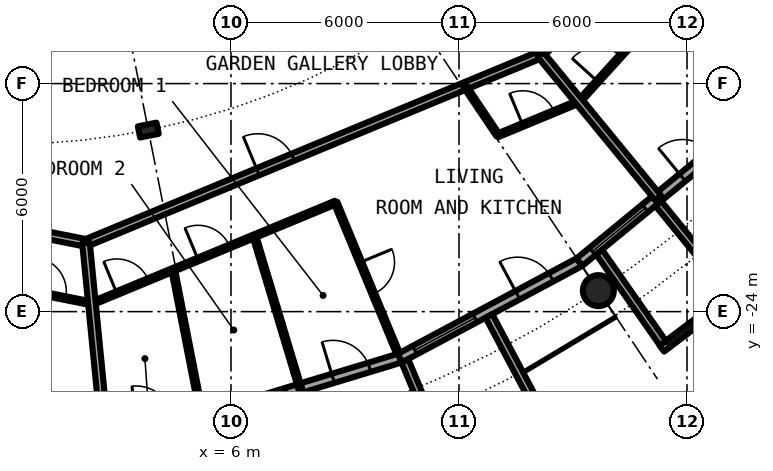
"""IFC4 building model, lengths in metres.
Left out: names, types, materials, properties, quantities, classifications, styles, units other than length and angle.
Written with IfcOpenShell. Run it as: python <this file> out.ifc"""

import sys

from ifc_helpers import new_model, si_unit, direction, frame, frame_2d, origin, origin_2d, place, context, subcontext, project, spatial, rectangle, circle, hollow_circle, i_section, extrude, element, fill, save


model = new_model("IFC4")
c1 = context("Model", 3, precision=1e-05, world=origin(), true_north=direction((0.0, 1.0)))
c2 = subcontext(c1, "Body", "Model", "MODEL_VIEW")
j1 = project(units=[si_unit("LENGTHUNIT", "METRE"), si_unit("PLANEANGLEUNIT", "RADIAN")], contexts=[c1])
p1 = place(None, origin())
s1 = spatial("IfcSite", under=j1, at=p1, CompositionType="ELEMENT")
p2 = place(p1, origin())
s2 = spatial("IfcBuilding", under=s1, at=p2, CompositionType="ELEMENT")
p3 = place(p2, frame((0.0, 0.0, 145.2)))
s3 = spatial("IfcBuildingStorey", under=s2, at=p3, CompositionType="ELEMENT", Elevation=145.2)
p4 = place(p3, frame((15.667, -23.448, 0.0), z_axis=(0.0, 0.0, 1.0), x_axis=(1.0, 0.0, 0.0)))
e1 = element("IfcColumn", 1, at=p4, inside=s3, PredefinedType="COLUMN", context=c2, shape_type="SweptSolid", body=[
    extrude(hollow_circle(Radius=0.406, WallThickness=0.04, at=origin_2d()), origin(), (0.0, 0.0, 1.0), 3.05),
])
p5 = place(p3, frame((3.824, -19.223, 0.0), z_axis=(0.0, 0.0, 1.0), x_axis=(0.195090322016, -0.980785280403, 0.0)))
e2 = element("IfcColumn", 2, at=p5, inside=s3, PredefinedType="COLUMN", context=c2, shape_type="SweptSolid", body=[
    extrude(i_section(OverallWidth=0.3, OverallDepth=0.5, WebThickness=0.014, FlangeThickness=0.028, FilletRadius=0.027, at=origin_2d()), origin(), (0.0, 0.0, 1.0), 3.05),
])
p6 = place(p3, frame((5.326, -26.775, 0.0), z_axis=(0.0, 0.0, 1.0), x_axis=(0.956965678721, 0.290201119486, 0.0)))
e3 = element("IfcWall", 3, at=p6, inside=s3, PredefinedType="SOLIDWALL", context=c2, shape_type="SweptSolid", body=[
    extrude(rectangle(XDim=5.351, YDim=0.25, at=frame_2d((2.676, 0.0))), origin(), (0.0, 0.0, 1.0), 2.7),
])
p7 = place(p6, frame((0.441, 0.0, 0.3)))
e4 = element("IfcOpeningElement", 4, at=p7, cuts=e3, PredefinedType="OPENING", context=c2, shape_type="SweptSolid", body=[
    extrude(rectangle(XDim=1.8, YDim=2.1, at=frame_2d((0.9, 1.05))), frame((0.0, 0.135, 0.0), z_axis=(0.0, -1.0, 0.0), x_axis=(1.0, 0.0, 0.0)), (0.0, 0.0, 1.0), 0.27),
])
p8 = place(p6, frame((3.51, 0.0, 0.0)))
e5 = element("IfcOpeningElement", 5, at=p8, cuts=e3, PredefinedType="OPENING", context=c2, shape_type="SweptSolid", body=[
    extrude(rectangle(XDim=1.0, YDim=2.2, at=frame_2d((0.5, 1.1))), frame((0.0, 0.135, 0.0), z_axis=(0.0, -1.0, 0.0), x_axis=(1.0, 0.0, 0.0)), (0.0, 0.0, 1.0), 0.27),
])
p9 = place(p3, frame((10.447, -25.222, 0.0), z_axis=(0.0, 0.0, 1.0), x_axis=(0.881915646801, 0.471407246368, 0.0)))
e6 = element("IfcWall", 6, at=p9, inside=s3, PredefinedType="SOLIDWALL", context=c2, shape_type="SweptSolid", body=[
    extrude(rectangle(XDim=5.352, YDim=0.25, at=frame_2d((2.676, 0.0))), origin(), (0.0, 0.0, 1.0), 2.7),
])
p10 = place(p9, frame((0.441, 0.0, 0.3)))
e7 = element("IfcOpeningElement", 7, at=p10, cuts=e6, PredefinedType="OPENING", context=c2, shape_type="SweptSolid", body=[
    extrude(rectangle(XDim=1.8, YDim=2.1, at=frame_2d((0.9, 1.05))), frame((0.0, 0.135, 0.0), z_axis=(0.0, -1.0, 0.0), x_axis=(1.0, 0.0, 0.0)), (0.0, 0.0, 1.0), 0.27),
])
p11 = place(p9, frame((3.51, 0.0, 0.0)))
e8 = element("IfcOpeningElement", 8, at=p11, cuts=e6, PredefinedType="OPENING", context=c2, shape_type="SweptSolid", body=[
    extrude(rectangle(XDim=1.0, YDim=2.2, at=frame_2d((0.5, 1.1))), frame((0.0, 0.135, 0.0), z_axis=(0.0, -1.0, 0.0), x_axis=(1.0, 0.0, 0.0)), (0.0, 0.0, 1.0), 0.27),
])
p12 = place(p3, frame((10.575, -25.295, -0.03), z_axis=(0.0, 0.0, 1.0), x_axis=(0.385697364644, -0.922625353492, 0.0)))
e9 = element("IfcWall", 9, at=p12, inside=s3, PredefinedType="SOLIDWALL", context=c2, shape_type="SweptSolid", body=[
    extrude(rectangle(XDim=2.883, YDim=0.2, at=frame_2d((1.442, 0.0))), origin(), (0.0, 0.0, 1.0), 2.73),
])
p13 = place(p3, frame((12.787, -24.113, -0.03), z_axis=(0.0, 0.0, 1.0), x_axis=(0.468365282436, -0.883534924159, 0.0)))
e10 = element("IfcWall", 10, at=p13, inside=s3, PredefinedType="SOLIDWALL", context=c2, shape_type="SweptSolid", body=[
    extrude(rectangle(XDim=3.006, YDim=0.2, at=frame_2d((1.503, 0.0))), origin(), (0.0, 0.0, 1.0), 2.73),
])
p14 = place(p3, frame((15.167, -22.699, 0.0), z_axis=(0.0, 0.0, 1.0), x_axis=(0.773019449054, 0.634382322723, 0.0)))
e11 = element("IfcWall", 11, at=p14, inside=s3, PredefinedType="SOLIDWALL", context=c2, shape_type="SweptSolid", body=[
    extrude(rectangle(XDim=5.352, YDim=0.25, at=frame_2d((2.676, 0.0))), origin(), (0.0, 0.0, 1.0), 2.7),
])
p15 = place(p14, frame((0.441, 0.0, 0.3)))
e12 = element("IfcOpeningElement", 12, at=p15, cuts=e11, PredefinedType="OPENING", context=c2, shape_type="SweptSolid", body=[
    extrude(rectangle(XDim=1.8, YDim=2.1, at=frame_2d((0.9, 1.05))), frame((0.0, 0.135, 0.0), z_axis=(0.0, -1.0, 0.0), x_axis=(1.0, 0.0, 0.0)), (0.0, 0.0, 1.0), 0.27),
])
p16 = place(p14, frame((3.51, 0.0, 0.0)))
e13 = element("IfcOpeningElement", 13, at=p16, cuts=e11, PredefinedType="OPENING", context=c2, shape_type="SweptSolid", body=[
    extrude(rectangle(XDim=1.0, YDim=2.2, at=frame_2d((0.5, 1.1))), frame((0.0, 0.135, 0.0), z_axis=(0.0, -1.0, 0.0), x_axis=(1.0, 0.0, 0.0)), (0.0, 0.0, 1.0), 0.27),
])
p17 = place(p3, frame((17.337, -24.972, -0.03), z_axis=(0.0, 0.0, 1.0), x_axis=(0.797887588059, 0.602806268067, 0.0)))
e14 = element("IfcWall", 14, at=p17, inside=s3, PredefinedType="SOLIDWALL", context=c2, shape_type="SweptSolid", body=[
    extrude(rectangle(XDim=2.447, YDim=0.2, at=frame_2d((1.223, 0.0))), origin(), (0.0, 0.0, 1.0), 2.73),
])
p18 = place(p17, frame((0.183, 0.0, 0.33)))
e15 = element("IfcOpeningElement", 15, at=p18, cuts=e14, PredefinedType="OPENING", context=c2, shape_type="SweptSolid", body=[
    extrude(circle(Radius=1.04, at=frame_2d((1.04, 1.04))), frame((0.0, 0.11, 0.0), z_axis=(0.0, -1.0, 0.0), x_axis=(1.0, 0.0, 0.0)), (0.0, 0.0, 1.0), 0.22),
])
p19 = place(p3, frame((15.688, -22.433, -0.03), z_axis=(0.0, 0.0, 1.0), x_axis=(0.573260687834, -0.819373043115, 0.0)))
e16 = element("IfcWall", 16, at=p19, inside=s3, PredefinedType="SOLIDWALL", context=c2, shape_type="SweptSolid", body=[
    extrude(rectangle(XDim=2.925, YDim=0.2, at=frame_2d((1.463, 0.0))), origin(), (0.0, 0.0, 1.0), 2.73),
])
p20 = place(p3, frame((17.246, -21.155, -0.03), z_axis=(0.0, 0.0, 1.0), x_axis=(0.631741648902, -0.775179004516, 0.0)))
e17 = element("IfcWall", 17, at=p20, inside=s3, PredefinedType="SOLIDWALL", context=c2, shape_type="SweptSolid", body=[
    extrude(rectangle(XDim=3.006, YDim=0.2, at=frame_2d((1.503, 0.0))), origin(), (0.0, 0.0, 1.0), 2.73),
])
p21 = place(p3, frame((15.162, -18.475, 0.0), z_axis=(0.0, 0.0, 1.0), x_axis=(0.671528384412, 0.740978831634, 0.0)))
e18 = element("IfcWall", 18, at=p21, inside=s3, PredefinedType="PARTITIONING", context=c2, shape_type="SweptSolid", body=[
    extrude(rectangle(XDim=2.338, YDim=0.1, at=frame_2d((1.169, 0.0))), origin(), (0.0, 0.0, 1.0), 2.7),
])
p22 = place(p21, frame((0.719, 0.0, 0.0)))
e19 = element("IfcOpeningElement", 19, at=p22, cuts=e18, PredefinedType="OPENING", context=c2, shape_type="SweptSolid", body=[
    extrude(rectangle(XDim=0.9, YDim=2.3, at=frame_2d((0.45, 1.15))), frame((0.0, 0.06, 0.0), z_axis=(0.0, -1.0, 0.0), x_axis=(1.0, 0.0, 0.0)), (0.0, 0.0, 1.0), 0.12),
])
p23 = place(p3, frame((0.074, -23.334, 0.0), z_axis=(0.0, 0.0, 1.0), x_axis=(0.98081942231, -0.194918600496, 0.0)))
e20 = element("IfcWall", 20, at=p23, inside=s3, PredefinedType="PARTITIONING", context=c2, shape_type="SweptSolid", body=[
    extrude(rectangle(XDim=2.313, YDim=0.1, at=frame_2d((1.157, 0.0))), origin(), (0.0, 0.0, 1.0), 2.7),
])
p24 = place(p23, frame((0.707, 0.0, 0.0)))
e21 = element("IfcOpeningElement", 21, at=p24, cuts=e20, PredefinedType="OPENING", context=c2, shape_type="SweptSolid", body=[
    extrude(rectangle(XDim=0.9, YDim=2.3, at=frame_2d((0.45, 1.15))), frame((0.0, 0.06, 0.0), z_axis=(0.0, -1.0, 0.0), x_axis=(1.0, 0.0, 0.0)), (0.0, 0.0, 1.0), 0.12),
])
p25 = place(p3, frame((2.342, -23.785, 0.0), z_axis=(0.0, 0.0, 1.0), x_axis=(0.92388173557, 0.382678113667, 0.0)))
e22 = element("IfcWall", 22, at=p25, inside=s3, PredefinedType="PARTITIONING", context=c2, shape_type="SweptSolid", body=[
    extrude(rectangle(XDim=6.938, YDim=0.1, at=frame_2d((3.469, 0.0))), origin(), (0.0, 0.0, 1.0), 2.7),
])
p26 = place(p25, frame((3.021, 0.0, 0.0)))
e23 = element("IfcOpeningElement", 23, at=p26, cuts=e22, PredefinedType="OPENING", context=c2, shape_type="SweptSolid", body=[
    extrude(rectangle(XDim=0.9, YDim=2.3, at=frame_2d((0.45, 1.15))), frame((0.0, 0.06, 0.0), z_axis=(0.0, -1.0, 0.0), x_axis=(1.0, 0.0, 0.0)), (0.0, 0.0, 1.0), 0.12),
])
p27 = place(p25, frame((0.707, 0.0, 0.0)))
e24 = element("IfcOpeningElement", 24, at=p27, cuts=e22, PredefinedType="OPENING", context=c2, shape_type="SweptSolid", body=[
    extrude(rectangle(XDim=0.9, YDim=2.3, at=frame_2d((0.45, 1.15))), frame((0.0, 0.06, 0.0), z_axis=(0.0, -1.0, 0.0), x_axis=(1.0, 0.0, 0.0)), (0.0, 0.0, 1.0), 0.12),
])
p28 = place(p3, frame((13.028, -19.359, 0.0), z_axis=(0.0, 0.0, 1.0), x_axis=(0.92369108554, 0.383138067142, 0.0)))
e25 = element("IfcWall", 25, at=p28, inside=s3, PredefinedType="PARTITIONING", context=c2, shape_type="SweptSolid", body=[
    extrude(rectangle(XDim=2.312, YDim=0.1, at=frame_2d((1.156, 0.0))), origin(), (0.0, 0.0, 1.0), 2.7),
])
p29 = place(p28, frame((0.703, 0.0, 0.0)))
e26 = element("IfcOpeningElement", 26, at=p29, cuts=e25, PredefinedType="OPENING", context=c2, shape_type="SweptSolid", body=[
    extrude(rectangle(XDim=0.9, YDim=2.3, at=frame_2d((0.45, 1.15))), frame((0.0, 0.06, 0.0), z_axis=(0.0, -1.0, 0.0), x_axis=(1.0, 0.0, 0.0)), (0.0, 0.0, 1.0), 0.12),
])
p30 = place(p3, frame((14.147, -17.238, 0.0), z_axis=(0.0, 0.0, 1.0), x_axis=(0.671561669125, 0.740948665268, 0.0)))
e27 = element("IfcWall", 27, at=p30, inside=s3, PredefinedType="PARTITIONING", context=c2, shape_type="SweptSolid", body=[
    extrude(rectangle(XDim=6.544, YDim=0.2, at=frame_2d((3.272, 0.0))), origin(), (0.0, 0.0, 1.0), 2.7),
])
p31 = place(p30, frame((3.862, 0.0, 0.0)))
e28 = element("IfcOpeningElement", 28, at=p31, cuts=e27, PredefinedType="OPENING", context=c2, shape_type="SweptSolid", body=[
    extrude(rectangle(XDim=1.0, YDim=2.3, at=frame_2d((0.5, 1.15))), frame((0.0, 0.11, 0.0), z_axis=(0.0, -1.0, 0.0), x_axis=(1.0, 0.0, 0.0)), (0.0, 0.0, 1.0), 0.22),
])
p32 = place(p3, frame((-10.512, -19.667, 0.0), z_axis=(0.0, 0.0, 1.0), x_axis=(0.980780341017, -0.195115152343, 0.0)))
e29 = element("IfcWall", 29, at=p32, inside=s3, PredefinedType="PARTITIONING", context=c2, shape_type="SweptSolid", body=[
    extrude(rectangle(XDim=12.947, YDim=0.2, at=frame_2d((6.473, 0.0))), origin(), (0.0, 0.0, 1.0), 2.7),
])
p33 = place(p32, frame((4.894, 0.0, 0.0)))
e30 = element("IfcOpeningElement", 30, at=p33, cuts=e29, PredefinedType="OPENING", context=c2, shape_type="SweptSolid", body=[
    extrude(rectangle(XDim=1.0, YDim=2.3, at=frame_2d((0.5, 1.15))), frame((0.0, 0.11, 0.0), z_axis=(0.0, -1.0, 0.0), x_axis=(1.0, 0.0, 0.0)), (0.0, 0.0, 1.0), 0.22),
])
p34 = place(p3, frame((2.186, -22.193, 0.0), z_axis=(0.0, 0.0, 1.0), x_axis=(0.923860535822, 0.382729291212, 0.0)))
e31 = element("IfcWall", 31, at=p34, inside=s3, PredefinedType="PARTITIONING", context=c2, shape_type="SweptSolid", body=[
    extrude(rectangle(XDim=12.947, YDim=0.2, at=frame_2d((6.473, 0.0))), origin(), (0.0, 0.0, 1.0), 2.7),
])
p35 = place(p34, frame((4.894, 0.0, 0.0)))
e32 = element("IfcOpeningElement", 32, at=p35, cuts=e31, PredefinedType="OPENING", context=c2, shape_type="SweptSolid", body=[
    extrude(rectangle(XDim=1.0, YDim=2.3, at=frame_2d((0.5, 1.15))), frame((0.0, 0.11, 0.0), z_axis=(0.0, -1.0, 0.0), x_axis=(1.0, 0.0, 0.0)), (0.0, 0.0, 1.0), 0.22),
])
p36 = place(p3, frame((2.184, -22.193, 0.0), z_axis=(0.0, 0.0, 1.0), x_axis=(0.098070432075, -0.995179476453, 0.0)))
e33 = element("IfcWall", 33, at=p36, inside=s3, PredefinedType="PARTITIONING", context=c2, shape_type="SweptSolid", body=[
    extrude(rectangle(XDim=4.874, YDim=0.2, at=frame_2d((2.437, 0.0))), origin(), (0.0, 0.0, 1.0), 2.7),
])
p37 = place(p3, frame((4.479, -22.9, 0.0), z_axis=(0.0, 0.0, 1.0), x_axis=(0.192118055779, -0.981371821811, 0.0)))
e34 = element("IfcWall", 34, at=p37, inside=s3, PredefinedType="PARTITIONING", context=c2, shape_type="SweptSolid", body=[
    extrude(rectangle(XDim=3.842, YDim=0.1, at=frame_2d((1.921, 0.0))), origin(), (0.0, 0.0, 1.0), 2.7),
])
p38 = place(p3, frame((6.616, -22.015, 0.0), z_axis=(0.0, 0.0, 1.0), x_axis=(0.287802539521, -0.957689771401, 0.0)))
e35 = element("IfcWall", 35, at=p38, inside=s3, PredefinedType="PARTITIONING", context=c2, shape_type="SweptSolid", body=[
    extrude(rectangle(XDim=4.187, YDim=0.1, at=frame_2d((2.094, 0.0))), origin(), (0.0, 0.0, 1.0), 2.7),
])
p39 = place(p3, frame((8.752, -21.13, 0.0), z_axis=(0.0, 0.0, 1.0), x_axis=(0.382689142274, -0.923877167369, 0.0)))
e36 = element("IfcWall", 36, at=p39, inside=s3, PredefinedType="PARTITIONING", context=c2, shape_type="SweptSolid", body=[
    extrude(rectangle(XDim=4.304, YDim=0.1, at=frame_2d((2.152, 0.0))), origin(), (0.0, 0.0, 1.0), 2.7),
])
p40 = place(p39, frame((1.702, 0.0, 0.0)))
e37 = element("IfcOpeningElement", 37, at=p40, cuts=e36, PredefinedType="OPENING", context=c2, shape_type="SweptSolid", body=[
    extrude(rectangle(XDim=0.9, YDim=2.3, at=frame_2d((0.45, 1.15))), frame((0.0, 0.06, 0.0), z_axis=(0.0, -1.0, 0.0), x_axis=(1.0, 0.0, 0.0)), (0.0, 0.0, 1.0), 0.12),
])
p41 = place(p3, frame((12.153, -18.064, 0.0), z_axis=(0.0, 0.0, 1.0), x_axis=(0.558121913892, -0.829758958514, 0.0)))
e38 = element("IfcWall", 38, at=p41, inside=s3, PredefinedType="PARTITIONING", context=c2, shape_type="SweptSolid", body=[
    extrude(rectangle(XDim=1.562, YDim=0.1, at=frame_2d((0.781, 0.0))), origin(), (0.0, 0.0, 1.0), 2.7),
])
p42 = place(p3, frame((14.147, -17.238, 0.0), z_axis=(0.0, 0.0, 1.0), x_axis=(0.634374159378, -0.773026148273, 0.0)))
e39 = element("IfcWall", 39, at=p42, inside=s3, PredefinedType="PARTITIONING", context=c2, shape_type="SweptSolid", body=[
    extrude(rectangle(XDim=4.876, YDim=0.2, at=frame_2d((2.438, 0.0))), origin(), (0.0, 0.0, 1.0), 2.7),
])
p43 = place(p8, origin())
e40 = element("IfcDoor", 40, at=p43, inside=s3, OperationType="SINGLE_SWING_LEFT", PredefinedType="DOOR", context=c2, shape_type="SweptSolid", body=[
    extrude(rectangle(XDim=1.0, YDim=2.2, at=frame_2d((0.5, 1.1))), frame((0.0, 0.025, 0.0), z_axis=(0.0, -1.0, 0.0), x_axis=(1.0, 0.0, 0.0)), (0.0, 0.0, 1.0), 0.05),
])
fill(e5, e40)
p44 = place(p10, origin())
e41 = element("IfcWindow", 41, at=p44, inside=s3, PartitioningType="SINGLE_PANEL", PredefinedType="WINDOW", context=c2, shape_type="SweptSolid", body=[
    extrude(rectangle(XDim=1.8, YDim=2.1, at=frame_2d((0.9, 1.05))), frame((0.0, 0.03, 0.0), z_axis=(0.0, -1.0, 0.0), x_axis=(1.0, 0.0, 0.0)), (0.0, 0.0, 1.0), 0.06),
])
fill(e7, e41)
p45 = place(p11, origin())
e42 = element("IfcDoor", 42, at=p45, inside=s3, OperationType="SINGLE_SWING_LEFT", PredefinedType="DOOR", context=c2, shape_type="SweptSolid", body=[
    extrude(rectangle(XDim=1.0, YDim=2.2, at=frame_2d((0.5, 1.1))), frame((0.0, 0.025, 0.0), z_axis=(0.0, -1.0, 0.0), x_axis=(1.0, 0.0, 0.0)), (0.0, 0.0, 1.0), 0.05),
])
fill(e8, e42)
p46 = place(p15, origin())
e43 = element("IfcWindow", 43, at=p46, inside=s3, PartitioningType="SINGLE_PANEL", PredefinedType="WINDOW", context=c2, shape_type="SweptSolid", body=[
    extrude(rectangle(XDim=1.8, YDim=2.1, at=frame_2d((0.9, 1.05))), frame((0.0, 0.03, 0.0), z_axis=(0.0, -1.0, 0.0), x_axis=(1.0, 0.0, 0.0)), (0.0, 0.0, 1.0), 0.06),
])
fill(e12, e43)
p47 = place(p18, origin())
e44 = element("IfcWindow", 44, at=p47, inside=s3, PartitioningType="SINGLE_PANEL", PredefinedType="WINDOW", context=c2, shape_type="SweptSolid", body=[
    extrude(circle(Radius=1.04, at=frame_2d((1.04, 1.04))), frame((0.0, 0.03, 0.0), z_axis=(0.0, -1.0, 0.0), x_axis=(1.0, 0.0, 0.0)), (0.0, 0.0, 1.0), 0.06),
])
fill(e15, e44)
p48 = place(p16, origin())
e45 = element("IfcDoor", 45, at=p48, inside=s3, OperationType="SINGLE_SWING_LEFT", PredefinedType="DOOR", context=c2, shape_type="SweptSolid", body=[
    extrude(rectangle(XDim=1.0, YDim=2.2, at=frame_2d((0.5, 1.1))), frame((0.0, 0.025, 0.0), z_axis=(0.0, -1.0, 0.0), x_axis=(1.0, 0.0, 0.0)), (0.0, 0.0, 1.0), 0.05),
])
fill(e13, e45)
p49 = place(p24, origin())
e46 = element("IfcDoor", 46, at=p49, inside=s3, OperationType="SINGLE_SWING_RIGHT", PredefinedType="DOOR", context=c2, shape_type="SweptSolid", body=[
    extrude(rectangle(XDim=0.9, YDim=2.3, at=frame_2d((0.45, 1.15))), frame((0.0, 0.025, 0.0), z_axis=(0.0, -1.0, 0.0), x_axis=(1.0, 0.0, 0.0)), (0.0, 0.0, 1.0), 0.05),
])
fill(e21, e46)
p50 = place(p35, origin())
e47 = element("IfcDoor", 47, at=p50, inside=s3, OperationType="SINGLE_SWING_LEFT", PredefinedType="DOOR", context=c2, shape_type="SweptSolid", body=[
    extrude(rectangle(XDim=1.0, YDim=2.3, at=frame_2d((0.5, 1.15))), frame((0.0, 0.025, 0.0), z_axis=(0.0, -1.0, 0.0), x_axis=(1.0, 0.0, 0.0)), (0.0, 0.0, 1.0), 0.05),
])
fill(e32, e47)
p51 = place(p29, origin())
e48 = element("IfcDoor", 48, at=p51, inside=s3, OperationType="SINGLE_SWING_LEFT", PredefinedType="DOOR", context=c2, shape_type="SweptSolid", body=[
    extrude(rectangle(XDim=0.9, YDim=2.3, at=frame_2d((0.45, 1.15))), frame((0.0, 0.025, 0.0), z_axis=(0.0, -1.0, 0.0), x_axis=(1.0, 0.0, 0.0)), (0.0, 0.0, 1.0), 0.05),
])
fill(e26, e48)
p52 = place(p40, origin())
e49 = element("IfcDoor", 49, at=p52, inside=s3, OperationType="SINGLE_SWING_RIGHT", PredefinedType="DOOR", context=c2, shape_type="SweptSolid", body=[
    extrude(rectangle(XDim=0.9, YDim=2.3, at=frame_2d((0.45, 1.15))), frame((0.0, 0.025, 0.0), z_axis=(0.0, -1.0, 0.0), x_axis=(1.0, 0.0, 0.0)), (0.0, 0.0, 1.0), 0.05),
])
fill(e37, e49)
p53 = place(p26, origin())
e50 = element("IfcDoor", 50, at=p53, inside=s3, OperationType="SINGLE_SWING_RIGHT", PredefinedType="DOOR", context=c2, shape_type="SweptSolid", body=[
    extrude(rectangle(XDim=0.9, YDim=2.3, at=frame_2d((0.45, 1.15))), frame((0.0, 0.025, 0.0), z_axis=(0.0, -1.0, 0.0), x_axis=(1.0, 0.0, 0.0)), (0.0, 0.0, 1.0), 0.05),
])
fill(e23, e50)
p54 = place(p27, origin())
e51 = element("IfcDoor", 51, at=p54, inside=s3, OperationType="SINGLE_SWING_LEFT", PredefinedType="DOOR", context=c2, shape_type="SweptSolid", body=[
    extrude(rectangle(XDim=0.9, YDim=2.3, at=frame_2d((0.45, 1.15))), frame((0.0, 0.025, 0.0), z_axis=(0.0, -1.0, 0.0), x_axis=(1.0, 0.0, 0.0)), (0.0, 0.0, 1.0), 0.05),
])
fill(e24, e51)
p55 = place(p22, origin())
e52 = element("IfcDoor", 52, at=p55, inside=s3, OperationType="SINGLE_SWING_LEFT", PredefinedType="DOOR", context=c2, shape_type="SweptSolid", body=[
    extrude(rectangle(XDim=0.9, YDim=2.3, at=frame_2d((0.45, 1.15))), frame((0.0, 0.025, 0.0), z_axis=(0.0, -1.0, 0.0), x_axis=(1.0, 0.0, 0.0)), (0.0, 0.0, 1.0), 0.05),
])
fill(e19, e52)
save(model, sys.argv[1])
